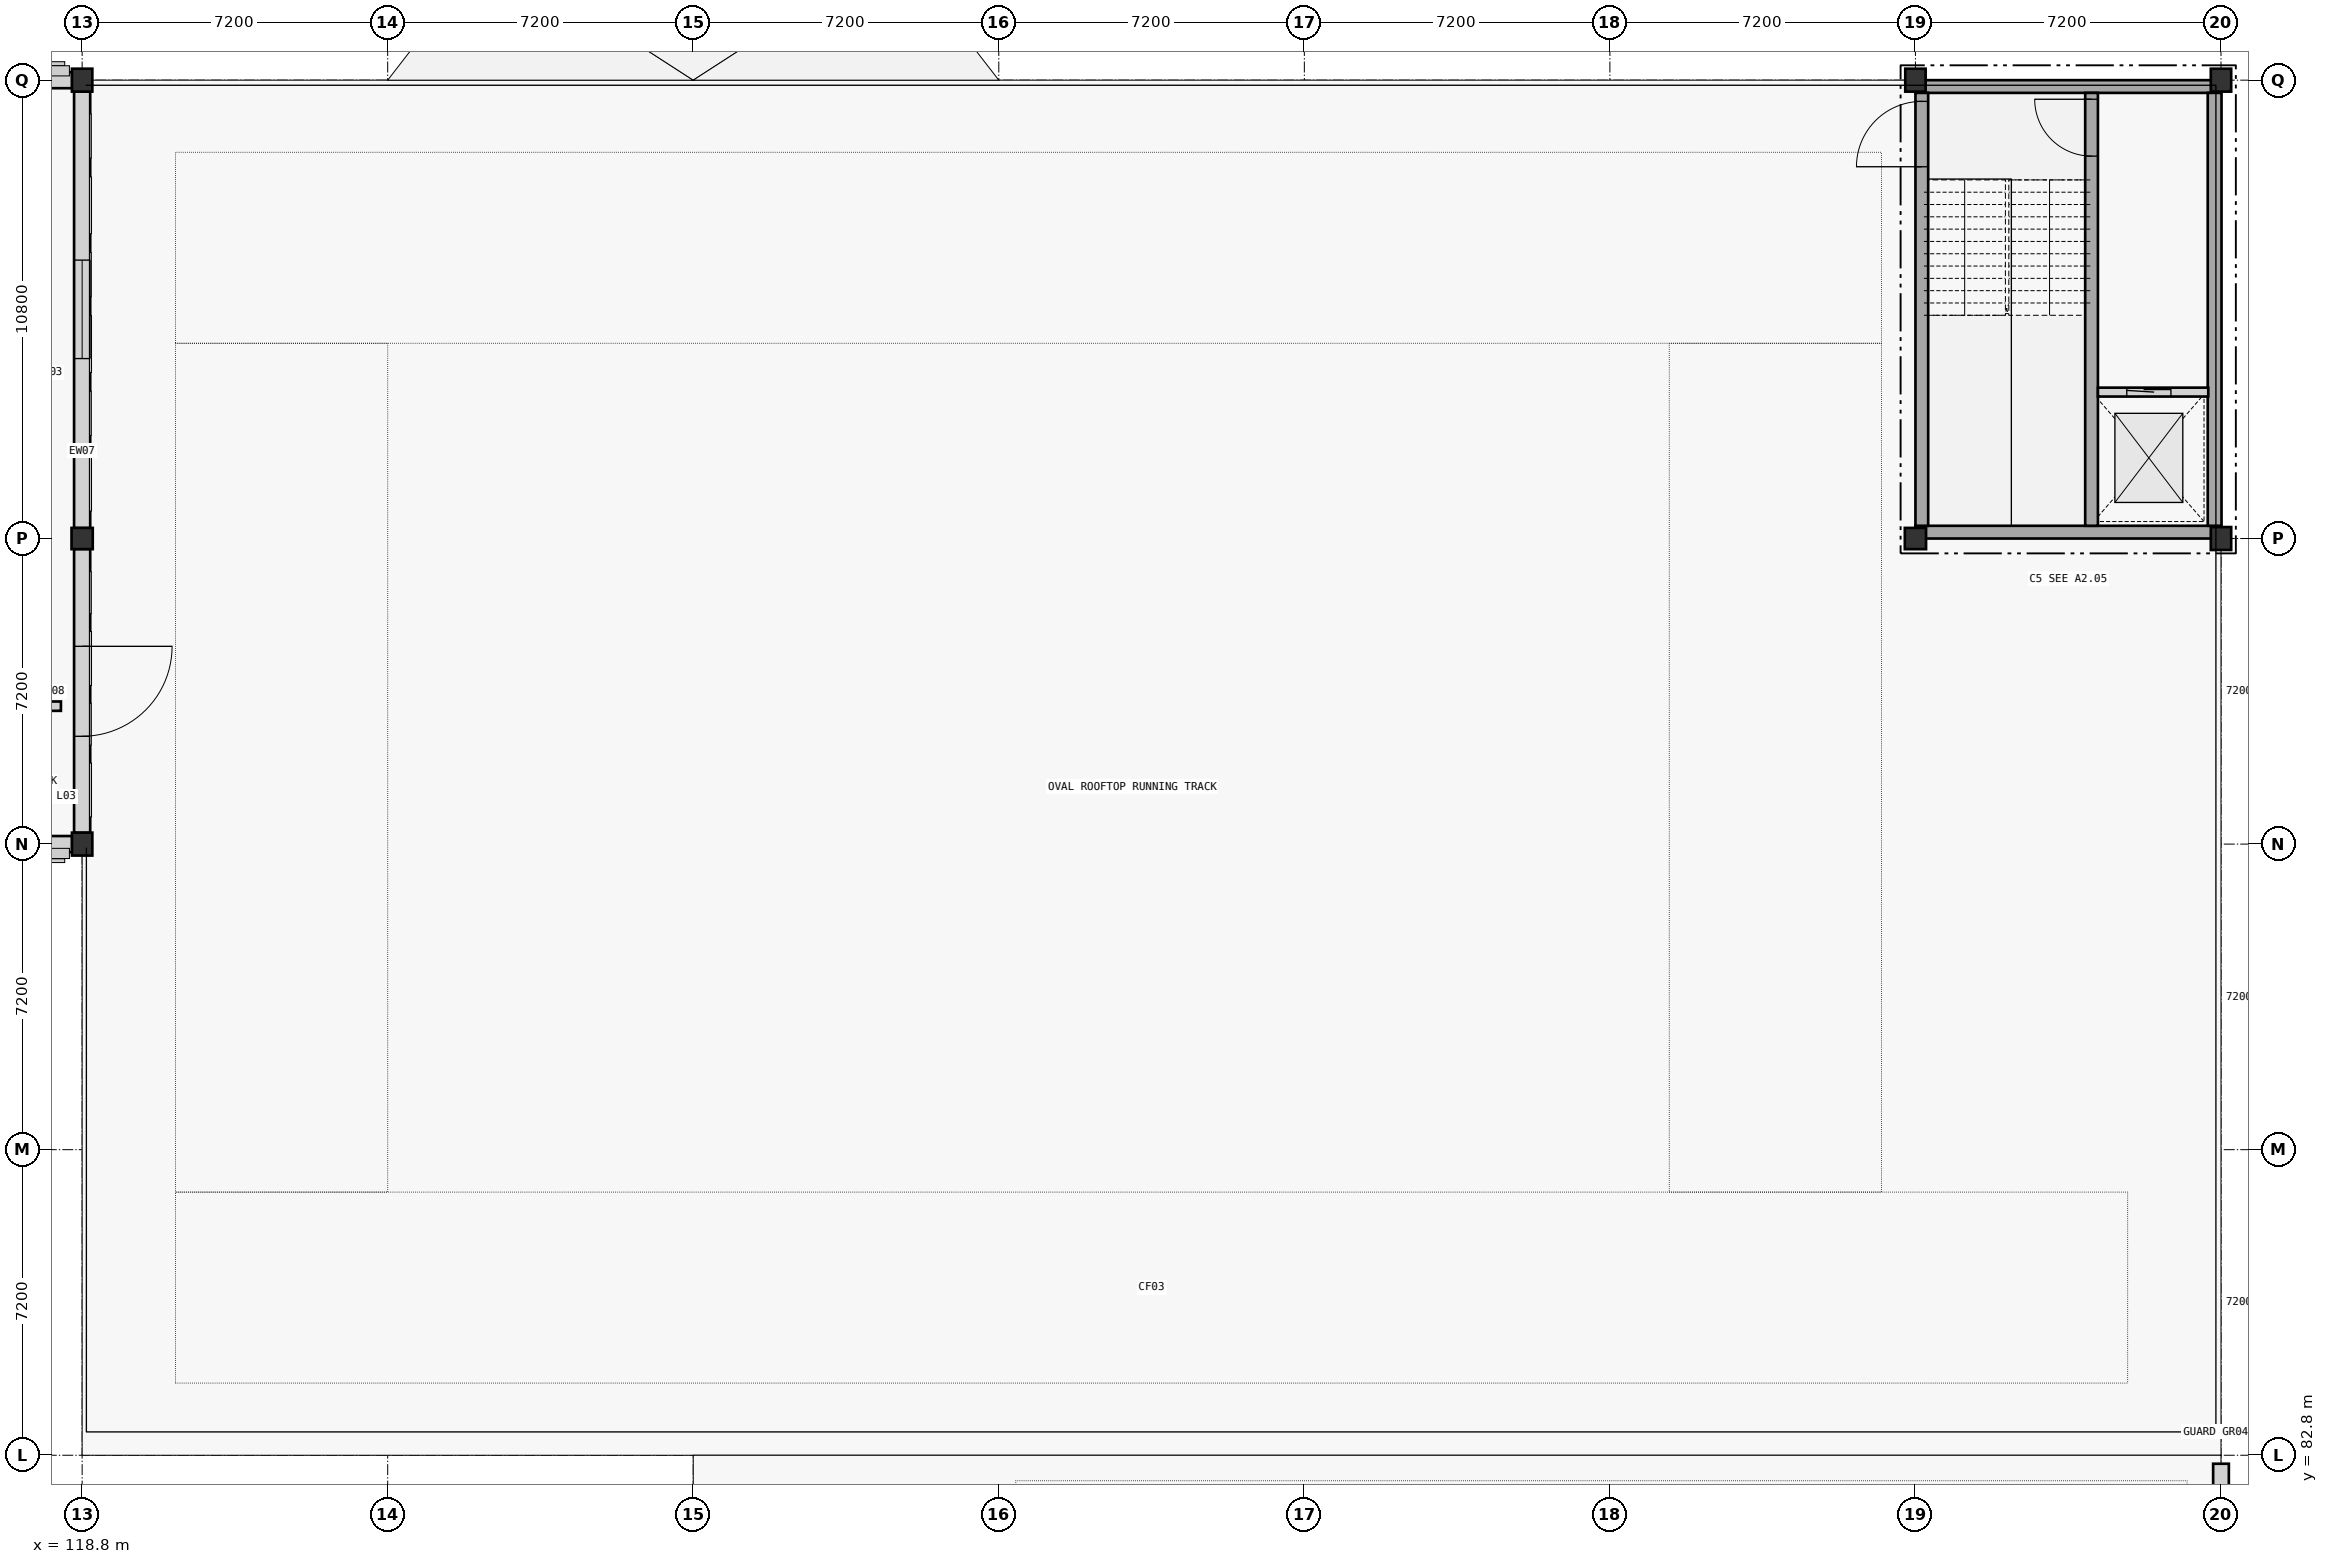
"""IFC4 building model, lengths in metres.
Left out: names, types, materials, properties, quantities, classifications, styles, units other than length and angle.
Written with IfcOpenShell. Run it as: python <this file> out.ifc"""

import sys

from ifc_helpers import new_model, si_unit, direction, frame, frame_2d, origin, origin_2d, place, context, subcontext, project, spatial, rectangle, extrude, element, fill, save


model = new_model("IFC4")
c1 = context("Model", 3, precision=1e-05, world=origin(), true_north=direction((0.0, 1.0)))
c2 = subcontext(c1, "Body", "Model", "MODEL_VIEW")
j1 = project(units=[si_unit("LENGTHUNIT", "METRE"), si_unit("PLANEANGLEUNIT", "RADIAN")], contexts=[c1])
p1 = place(None, origin())
s1 = spatial("IfcSite", under=j1, at=p1, CompositionType="ELEMENT")
p2 = place(p1, origin())
s2 = spatial("IfcBuilding", under=s1, at=p2, CompositionType="ELEMENT")
p3 = place(p2, frame((0.0, 0.0, 15.0)))
s3 = spatial("IfcBuildingStorey", under=s2, at=p3, CompositionType="ELEMENT", Elevation=15.0)
p4 = place(p3, frame((118.8, 97.2, 0.0), z_axis=(0.0, 0.0, 1.0), x_axis=(1.0, 0.0, 0.0)))
e1 = element("IfcColumn", 1, at=p4, inside=s3, PredefinedType="COLUMN", context=c2, shape_type="SweptSolid", body=[
    extrude(rectangle(XDim=0.48, YDim=0.54, at=origin_2d()), origin(), (0.0, 0.0, 1.0), 4.2),
])
p5 = place(p3, frame((118.8, 104.4, 0.0), z_axis=(0.0, 0.0, 1.0), x_axis=(1.0, 0.0, 0.0)))
e2 = element("IfcColumn", 2, at=p5, inside=s3, PredefinedType="COLUMN", context=c2, shape_type="SweptSolid", body=[
    extrude(rectangle(XDim=0.5, YDim=0.5, at=origin_2d()), origin(), (0.0, 0.0, 1.0), 4.2),
])
p6 = place(p3, frame((118.8, 115.2, 0.0), z_axis=(0.0, 0.0, 1.0), x_axis=(1.0, 0.0, 0.0)))
e3 = element("IfcColumn", 3, at=p6, inside=s3, PredefinedType="COLUMN", context=c2, shape_type="SweptSolid", body=[
    extrude(rectangle(XDim=0.48, YDim=0.54, at=origin_2d()), origin(), (0.0, 0.0, 1.0), 4.2),
])
p7 = place(p3, frame((162.0, 104.4, 0.0), z_axis=(0.0, 0.0, 1.0), x_axis=(1.0, 0.0, 0.0)))
e4 = element("IfcColumn", 4, at=p7, inside=s3, PredefinedType="COLUMN", context=c2, shape_type="SweptSolid", body=[
    extrude(rectangle(XDim=0.5, YDim=0.5, at=origin_2d()), origin(), (0.0, 0.0, 1.0), 4.2),
])
for number, where, z_axis, x_axis in (
    (5, (162.0, 115.2, 0.0), (0.0, 0.0, 1.0), (1.0, 0.0, 0.0)),
    (6, (169.2, 104.4, 0.0), (0.0, 0.0, 1.0), (1.0, 0.0, 0.0)),
    (7, (169.2, 115.2, 0.0), (0.0, 0.0, 1.0), (1.0, 0.0, 0.0)),
):
    element("IfcColumn", number, at=place(p3, frame(where, z_axis=z_axis, x_axis=x_axis)), inside=s3, PredefinedType="COLUMN", context=c2, shape_type="SweptSolid", body=[
        extrude(rectangle(XDim=0.48, YDim=0.54, at=origin_2d()), origin(), (0.0, 0.0, 1.0), 4.2),
    ])
for number, where, z_axis, x_axis in (
    (8, (169.2, 104.55, 0.0), (0.0, 0.0, 1.0), (-1.0, 0.0, 0.0)),
    (9, (162.0, 115.05, 0.0), (0.0, 0.0, 1.0), (1.0, 0.0, 0.0)),
):
    element("IfcWall", number, at=place(p3, frame(where, z_axis=z_axis, x_axis=x_axis)), inside=s3, PredefinedType="SHEAR", context=c2, shape_type="SweptSolid", body=[
        extrude(rectangle(XDim=7.2, YDim=0.3, at=frame_2d((3.6, 0.0))), origin(), (0.0, 0.0, 1.0), 4.2),
    ])
p8 = place(p3, frame((162.15, 104.7, 0.0), z_axis=(0.0, 0.0, 1.0), x_axis=(0.0, 1.0, 0.0)))
e10 = element("IfcWall", 10, at=p8, inside=s3, PredefinedType="SHEAR", context=c2, shape_type="SweptSolid", body=[
    extrude(rectangle(XDim=10.2, YDim=0.3, at=frame_2d((5.1, 0.0))), origin(), (0.0, 0.0, 1.0), 4.2),
])
p9 = place(p8, frame((8.46, 0.0, 0.0)))
e11 = element("IfcOpeningElement", 11, at=p9, cuts=e10, PredefinedType="OPENING", context=c2, shape_type="SweptSolid", body=[
    extrude(rectangle(XDim=1.54, YDim=2.22, at=frame_2d((0.77, 1.11))), frame((0.0, 0.15, 0.0), z_axis=(0.0, -1.0, 0.0), x_axis=(1.0, 0.0, 0.0)), (0.0, 0.0, 1.0), 0.3),
])
p10 = place(p3, frame((169.05, 114.9, 0.0), z_axis=(0.0, 0.0, 1.0), x_axis=(0.0, -1.0, 0.0)))
e12 = element("IfcWall", 12, at=p10, inside=s3, PredefinedType="SHEAR", context=c2, shape_type="SweptSolid", body=[
    extrude(rectangle(XDim=10.2, YDim=0.325, at=frame_2d((5.1, 0.0))), origin(), (0.0, 0.0, 1.0), 4.2),
])
p11 = place(p3, frame((166.15, 104.7, 0.0), z_axis=(0.0, 0.0, 1.0), x_axis=(0.0, 1.0, 0.0)))
e13 = element("IfcWall", 13, at=p11, inside=s3, PredefinedType="SHEAR", context=c2, shape_type="SweptSolid", body=[
    extrude(rectangle(XDim=10.2, YDim=0.3, at=frame_2d((5.1, 0.0))), origin(), (0.0, 0.0, 1.0), 4.2),
])
p12 = place(p11, frame((8.71, 0.0, 0.0)))
e14 = element("IfcOpeningElement", 14, at=p12, cuts=e13, PredefinedType="OPENING", context=c2, shape_type="SweptSolid", body=[
    extrude(rectangle(XDim=1.34, YDim=2.18, at=frame_2d((0.67, 1.09))), frame((0.0, 0.15, 0.0), z_axis=(0.0, -1.0, 0.0), x_axis=(1.0, 0.0, 0.0)), (0.0, 0.0, 1.0), 0.3),
])
p13 = place(p3, frame((111.836, 115.2, 0.0), z_axis=(0.0, 0.0, 1.0), x_axis=(1.0, 0.0, 0.0)))
e15 = element("IfcWall", 15, at=p13, inside=s3, PredefinedType="STANDARD", context=c2, shape_type="SweptSolid", body=[
    extrude(rectangle(XDim=6.728, YDim=0.38, at=frame_2d((3.364, 0.0))), origin(), (0.0, 0.0, 1.0), 3.26),
])
p14 = place(p3, frame((118.8, 104.154, 0.0), z_axis=(0.0, 0.0, 1.0), x_axis=(0.0, -1.0, 0.0)))
e16 = element("IfcWall", 16, at=p14, inside=s3, PredefinedType="STANDARD", context=c2, shape_type="SweptSolid", body=[
    extrude(rectangle(XDim=6.688, YDim=0.38, at=frame_2d((3.344, 0.0))), origin(), (0.0, 0.0, 1.0), 3.26),
])
p15 = place(p14, frame((2.294, 0.0, 0.0)))
e17 = element("IfcOpeningElement", 17, at=p15, cuts=e16, PredefinedType="OPENING", context=c2, shape_type="SweptSolid", body=[
    extrude(rectangle(XDim=2.12, YDim=2.34, at=frame_2d((1.06, 1.17))), frame((0.0, 0.19, 0.0), z_axis=(0.0, -1.0, 0.0), x_axis=(1.0, 0.0, 0.0)), (0.0, 0.0, 1.0), 0.38),
])
p16 = place(p3, frame((118.8, 114.934, 0.0), z_axis=(0.0, 0.0, 1.0), x_axis=(0.0, -1.0, 0.0)))
e18 = element("IfcWall", 18, at=p16, inside=s3, PredefinedType="STANDARD", context=c2, shape_type="SweptSolid", body=[
    extrude(rectangle(XDim=10.288, YDim=0.38, at=frame_2d((5.144, 0.0))), origin(), (0.0, 0.0, 1.0), 3.17),
])
p17 = place(p16, frame((3.974, 0.0, 0.9)))
e19 = element("IfcOpeningElement", 19, at=p17, cuts=e18, PredefinedType="OPENING", context=c2, shape_type="SweptSolid", body=[
    extrude(rectangle(XDim=2.32, YDim=1.52, at=frame_2d((1.16, 0.76))), frame((0.0, 0.19, 0.0), z_axis=(0.0, -1.0, 0.0), x_axis=(1.0, 0.0, 0.0)), (0.0, 0.0, 1.0), 0.38),
])
p18 = place(p3, frame((118.564, 97.2, 0.0), z_axis=(0.0, 0.0, 1.0), x_axis=(-1.0, 0.0, 0.0)))
e20 = element("IfcWall", 20, at=p18, inside=s3, PredefinedType="STANDARD", context=c2, shape_type="SweptSolid", body=[
    extrude(rectangle(XDim=6.728, YDim=0.38, at=frame_2d((3.364, 0.0))), origin(), (0.0, 0.0, 1.0), 3.26),
])
p19 = place(p18, frame((2.584, 0.0, 0.9)))
e21 = element("IfcOpeningElement", 21, at=p19, cuts=e20, PredefinedType="OPENING", context=c2, shape_type="SweptSolid", body=[
    extrude(rectangle(XDim=1.56, YDim=2.16, at=frame_2d((0.78, 1.08))), frame((0.0, 0.19, 0.0), z_axis=(0.0, -1.0, 0.0), x_axis=(1.0, 0.0, 0.0)), (0.0, 0.0, 1.0), 0.38),
])
p20 = place(p3, frame((169.2, 82.6, 0.0), z_axis=(0.0, 0.0, 1.0), x_axis=(0.0, -1.0, 0.0)))
e22 = element("IfcWall", 22, at=p20, inside=s3, PredefinedType="PARAPET", context=c2, shape_type="SweptSolid", body=[
    extrude(rectangle(XDim=6.8, YDim=0.37, at=frame_2d((3.4, 0.0))), origin(), (0.0, 0.0, 1.0), 0.65),
])
p21 = place(p3, frame((166.3, 107.85, 0.0), z_axis=(0.0, 0.0, 1.0), x_axis=(1.0, 0.0, 0.0)))
e23 = element("IfcWall", 23, at=p21, inside=s3, PredefinedType="STANDARD", context=c2, shape_type="SweptSolid", body=[
    extrude(rectangle(XDim=2.6, YDim=0.21, at=frame_2d((1.3, 0.0))), origin(), (0.0, 0.0, 1.0), 4.2),
])
p22 = place(p21, frame((0.68, 0.0, 0.0)))
e24 = element("IfcOpeningElement", 24, at=p22, cuts=e23, PredefinedType="OPENING", context=c2, shape_type="SweptSolid", body=[
    extrude(rectangle(XDim=1.04, YDim=2.16, at=frame_2d((0.52, 1.08))), frame((0.0, 0.105, 0.0), z_axis=(0.0, -1.0, 0.0), x_axis=(1.0, 0.0, 0.0)), (0.0, 0.0, 1.0), 0.21),
])
p23 = place(p3, frame((112.0, 100.45, 0.0), z_axis=(0.0, 0.0, 1.0), x_axis=(1.0, 0.0, 0.0)))
e25 = element("IfcWall", 25, at=p23, inside=s3, PredefinedType="STANDARD", context=c2, shape_type="SweptSolid", body=[
    extrude(rectangle(XDim=6.3, YDim=0.22, at=frame_2d((3.15, 0.0))), origin(), (0.0, 0.0, 1.0), 3.06),
])
p24 = place(p23, frame((2.25, 0.0, 0.0)))
e26 = element("IfcOpeningElement", 26, at=p24, cuts=e25, PredefinedType="OPENING", context=c2, shape_type="SweptSolid", body=[
    extrude(rectangle(XDim=1.8, YDim=2.3, at=frame_2d((0.9, 1.15))), frame((0.0, 0.11, 0.0), z_axis=(0.0, -1.0, 0.0), x_axis=(1.0, 0.0, 0.0)), (0.0, 0.0, 1.0), 0.22),
])
p25 = place(p15, origin())
e27 = element("IfcDoor", 27, at=p25, inside=s3, OperationType="SINGLE_SWING_LEFT", PredefinedType="DOOR", context=c2, shape_type="SweptSolid", body=[
    extrude(rectangle(XDim=2.12, YDim=2.34, at=frame_2d((1.06, 1.17))), frame((0.0, 0.025, 0.0), z_axis=(0.0, -1.0, 0.0), x_axis=(1.0, 0.0, 0.0)), (0.0, 0.0, 1.0), 0.05),
])
fill(e17, e27)
p26 = place(p17, origin())
e28 = element("IfcWindow", 28, at=p26, inside=s3, PartitioningType="SINGLE_PANEL", PredefinedType="WINDOW", context=c2, shape_type="SweptSolid", body=[
    extrude(rectangle(XDim=2.32, YDim=1.52, at=frame_2d((1.16, 0.76))), frame((0.0, 0.03, 0.0), z_axis=(0.0, -1.0, 0.0), x_axis=(1.0, 0.0, 0.0)), (0.0, 0.0, 1.0), 0.06),
])
fill(e19, e28)
p27 = place(p22, origin())
e29 = element("IfcDoor", 29, at=p27, inside=s3, OperationType="SLIDING_TO_LEFT", PredefinedType="DOOR", context=c2, shape_type="SweptSolid", body=[
    extrude(rectangle(XDim=1.04, YDim=2.16, at=frame_2d((0.52, 1.08))), frame((0.0, 0.025, 0.0), z_axis=(0.0, -1.0, 0.0), x_axis=(1.0, 0.0, 0.0)), (0.0, 0.0, 1.0), 0.05),
])
fill(e24, e29)
p28 = place(p12, origin())
e30 = element("IfcDoor", 30, at=p28, inside=s3, OperationType="SINGLE_SWING_RIGHT", PredefinedType="DOOR", context=c2, shape_type="SweptSolid", body=[
    extrude(rectangle(XDim=1.34, YDim=2.18, at=frame_2d((0.67, 1.09))), frame((0.0, 0.025, 0.0), z_axis=(0.0, -1.0, 0.0), x_axis=(1.0, 0.0, 0.0)), (0.0, 0.0, 1.0), 0.05),
])
fill(e14, e30)
p29 = place(p9, origin())
e31 = element("IfcDoor", 31, at=p29, inside=s3, OperationType="SINGLE_SWING_LEFT", PredefinedType="DOOR", context=c2, shape_type="SweptSolid", body=[
    extrude(rectangle(XDim=1.54, YDim=2.22, at=frame_2d((0.77, 1.11))), frame((0.0, 0.025, 0.0), z_axis=(0.0, -1.0, 0.0), x_axis=(1.0, 0.0, 0.0)), (0.0, 0.0, 1.0), 0.05),
])
fill(e11, e31)
save(model, sys.argv[1])
